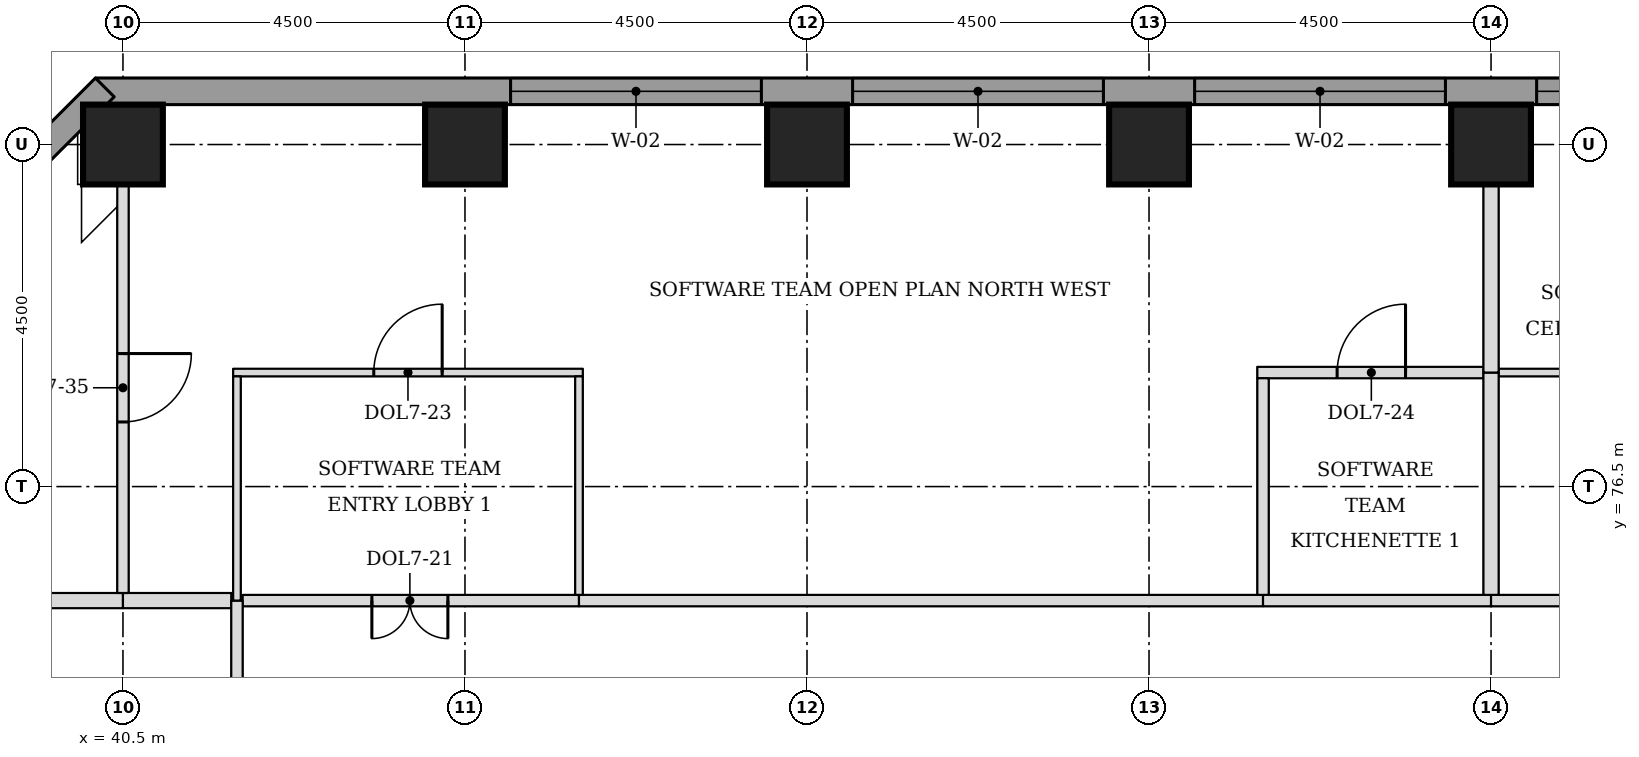
"""IFC4 building model, lengths in metres.
Left out: names, types, materials, properties, quantities, classifications, styles, units other than length and angle.
Written with IfcOpenShell. Run it as: python <this file> out.ifc"""

import sys

from ifc_helpers import new_model, si_unit, direction, frame, frame_2d, origin, origin_2d, place, context, subcontext, project, spatial, rectangle, extrude, element, fill, save


model = new_model("IFC4")
c1 = context("Model", 3, precision=1e-05, world=origin(), true_north=direction((0.0, 1.0)))
c2 = subcontext(c1, "Body", "Model", "MODEL_VIEW")
j1 = project(units=[si_unit("LENGTHUNIT", "METRE"), si_unit("PLANEANGLEUNIT", "RADIAN")], contexts=[c1])
p1 = place(None, origin())
s1 = spatial("IfcSite", under=j1, at=p1, CompositionType="ELEMENT")
p2 = place(p1, origin())
s2 = spatial("IfcBuilding", under=s1, at=p2, CompositionType="ELEMENT")
p3 = place(p2, frame((0.0, 0.0, 130.7)))
s3 = spatial("IfcBuildingStorey", under=s2, at=p3, CompositionType="ELEMENT", Elevation=130.7)
for number, where, z_axis, x_axis in (
    (1, (40.5, 81.0, 0.0), (0.0, 0.0, 1.0), (1.0, 0.0, 0.0)),
    (2, (45.0, 81.0, 0.0), (0.0, 0.0, 1.0), (1.0, 0.0, 0.0)),
    (3, (49.5, 81.0, 0.0), (0.0, 0.0, 1.0), (1.0, 0.0, 0.0)),
    (4, (54.0, 81.0, 0.0), (0.0, 0.0, 1.0), (1.0, 0.0, 0.0)),
    (5, (58.5, 81.0, 0.0), (0.0, 0.0, 1.0), (1.0, 0.0, 0.0)),
):
    element("IfcColumn", number, at=place(p3, frame(where, z_axis=z_axis, x_axis=x_axis)), inside=s3, PredefinedType="COLUMN", context=c2, shape_type="SweptSolid", body=[
        extrude(rectangle(XDim=1.05, YDim=1.05, at=origin_2d()), origin(), (0.0, 0.0, 1.0), 3.7),
    ])
p4 = place(p3, frame((72.362, 81.7, 0.0), z_axis=(0.0, 0.0, 1.0), x_axis=(-1.0, 0.0, 0.0)))
e6 = element("IfcWall", 6, at=p4, inside=s3, PredefinedType="STANDARD", context=c2, shape_type="SweptSolid", body=[
    extrude(rectangle(XDim=32.225, YDim=0.35, at=frame_2d((16.112, 0.0))), origin(), (0.0, 0.0, 1.0), 3.525),
])
p5 = place(p4, frame((5.462, 0.0, 0.9)))
e7 = element("IfcOpeningElement", 7, at=p5, cuts=e6, PredefinedType="OPENING", context=c2, shape_type="SweptSolid", body=[
    extrude(rectangle(XDim=3.3, YDim=1.9, at=frame_2d((1.65, 0.95))), frame((0.0, 0.185, 0.0), z_axis=(0.0, -1.0, 0.0), x_axis=(1.0, 0.0, 0.0)), (0.0, 0.0, 1.0), 0.37),
])
p6 = place(p4, frame((9.962, 0.0, 0.9)))
e8 = element("IfcOpeningElement", 8, at=p6, cuts=e6, PredefinedType="OPENING", context=c2, shape_type="SweptSolid", body=[
    extrude(rectangle(XDim=3.3, YDim=1.9, at=frame_2d((1.65, 0.95))), frame((0.0, 0.185, 0.0), z_axis=(0.0, -1.0, 0.0), x_axis=(1.0, 0.0, 0.0)), (0.0, 0.0, 1.0), 0.37),
])
p7 = place(p4, frame((14.462, 0.0, 0.9)))
e9 = element("IfcOpeningElement", 9, at=p7, cuts=e6, PredefinedType="OPENING", context=c2, shape_type="SweptSolid", body=[
    extrude(rectangle(XDim=3.3, YDim=1.9, at=frame_2d((1.65, 0.95))), frame((0.0, 0.185, 0.0), z_axis=(0.0, -1.0, 0.0), x_axis=(1.0, 0.0, 0.0)), (0.0, 0.0, 1.0), 0.37),
])
p8 = place(p4, frame((18.962, 0.0, 0.9)))
e10 = element("IfcOpeningElement", 10, at=p8, cuts=e6, PredefinedType="OPENING", context=c2, shape_type="SweptSolid", body=[
    extrude(rectangle(XDim=3.3, YDim=1.9, at=frame_2d((1.65, 0.95))), frame((0.0, 0.185, 0.0), z_axis=(0.0, -1.0, 0.0), x_axis=(1.0, 0.0, 0.0)), (0.0, 0.0, 1.0), 0.37),
])
p9 = place(p4, frame((23.462, 0.0, 0.9)))
e11 = element("IfcOpeningElement", 11, at=p9, cuts=e6, PredefinedType="OPENING", context=c2, shape_type="SweptSolid", body=[
    extrude(rectangle(XDim=3.3, YDim=1.9, at=frame_2d((1.65, 0.95))), frame((0.0, 0.185, 0.0), z_axis=(0.0, -1.0, 0.0), x_axis=(1.0, 0.0, 0.0)), (0.0, 0.0, 1.0), 0.37),
])
p10 = place(p3, frame((40.261, 81.751, 0.0), z_axis=(0.0, 0.0, 1.0), x_axis=(-0.707106781187, -0.707106781187, 0.0)))
e12 = element("IfcWall", 12, at=p10, inside=s3, PredefinedType="STANDARD", context=c2, shape_type="SweptSolid", body=[
    extrude(rectangle(XDim=7.089, YDim=0.35, at=frame_2d((3.544, 0.0))), origin(), (0.0, 0.0, 1.0), 3.525),
])
p11 = place(p10, frame((1.894, 0.0, 0.9)))
e13 = element("IfcOpeningElement", 13, at=p11, cuts=e12, PredefinedType="OPENING", context=c2, shape_type="SweptSolid", body=[
    extrude(rectangle(XDim=3.3, YDim=1.9, at=frame_2d((1.65, 0.95))), frame((0.0, 0.185, 0.0), z_axis=(0.0, -1.0, 0.0), x_axis=(1.0, 0.0, 0.0)), (0.0, 0.0, 1.0), 0.37),
])
p12 = place(p3, frame((35.475, 75.0, 0.0), z_axis=(0.0, 0.0, 1.0), x_axis=(1.0, 0.0, 0.0)))
e14 = element("IfcWall", 14, at=p12, inside=s3, PredefinedType="PARTITIONING", context=c2, shape_type="SweptSolid", body=[
    extrude(rectangle(XDim=5.025, YDim=0.2, at=frame_2d((2.512, 0.0))), origin(), (0.0, 0.0, 1.0), 3.55),
])
p13 = place(p3, frame((40.5, 75.0, 0.0), z_axis=(0.0, 0.0, 1.0), x_axis=(1.0, 0.0, 0.0)))
e15 = element("IfcWall", 15, at=p13, inside=s3, PredefinedType="PARTITIONING", context=c2, shape_type="SweptSolid", body=[
    extrude(rectangle(XDim=1.425, YDim=0.2, at=frame_2d((0.712, 0.0))), origin(), (0.0, 0.0, 1.0), 3.55),
])
p14 = place(p3, frame((42.075, 75.0, 0.0), z_axis=(0.0, 0.0, 1.0), x_axis=(1.0, 0.0, 0.0)))
e16 = element("IfcWall", 16, at=p14, inside=s3, PredefinedType="PARTITIONING", context=c2, shape_type="SweptSolid", body=[
    extrude(rectangle(XDim=4.425, YDim=0.15, at=frame_2d((2.212, 0.0))), origin(), (0.0, 0.0, 1.0), 3.55),
])
p15 = place(p14, frame((1.7, 0.0, 0.0)))
e17 = element("IfcOpeningElement", 17, at=p15, cuts=e16, PredefinedType="OPENING", context=c2, shape_type="SweptSolid", body=[
    extrude(rectangle(XDim=1.0, YDim=2.1, at=frame_2d((0.5, 1.05))), frame((0.0, 0.085, 0.0), z_axis=(0.0, -1.0, 0.0), x_axis=(1.0, 0.0, 0.0)), (0.0, 0.0, 1.0), 0.17),
])
p16 = place(p3, frame((46.5, 75.0, 0.0), z_axis=(0.0, 0.0, 1.0), x_axis=(1.0, 0.0, 0.0)))
e18 = element("IfcWall", 18, at=p16, inside=s3, PredefinedType="PARTITIONING", context=c2, shape_type="SweptSolid", body=[
    extrude(rectangle(XDim=9.0, YDim=0.15, at=frame_2d((4.5, 0.0))), origin(), (0.0, 0.0, 1.0), 3.55),
])
p17 = place(p3, frame((55.5, 75.0, 0.0), z_axis=(0.0, 0.0, 1.0), x_axis=(1.0, 0.0, 0.0)))
e19 = element("IfcWall", 19, at=p17, inside=s3, PredefinedType="PARTITIONING", context=c2, shape_type="SweptSolid", body=[
    extrude(rectangle(XDim=3.0, YDim=0.15, at=frame_2d((1.5, 0.0))), origin(), (0.0, 0.0, 1.0), 3.55),
])
p18 = place(p3, frame((58.5, 75.0, 0.0), z_axis=(0.0, 0.0, 1.0), x_axis=(1.0, 0.0, 0.0)))
e20 = element("IfcWall", 20, at=p18, inside=s3, PredefinedType="PARTITIONING", context=c2, shape_type="SweptSolid", body=[
    extrude(rectangle(XDim=12.0, YDim=0.15, at=frame_2d((6.0, 0.0))), origin(), (0.0, 0.0, 1.0), 3.55),
])
p19 = place(p18, frame((5.5, 0.0, 0.0)))
e21 = element("IfcOpeningElement", 21, at=p19, cuts=e20, PredefinedType="OPENING", context=c2, shape_type="SweptSolid", body=[
    extrude(rectangle(XDim=1.0, YDim=2.1, at=frame_2d((0.5, 1.05))), frame((0.0, 0.085, 0.0), z_axis=(0.0, -1.0, 0.0), x_axis=(1.0, 0.0, 0.0)), (0.0, 0.0, 1.0), 0.17),
])
p20 = place(p3, frame((41.95, 78.0, 0.0), z_axis=(0.0, 0.0, 1.0), x_axis=(1.0, 0.0, 0.0)))
e22 = element("IfcWall", 22, at=p20, inside=s3, PredefinedType="PARTITIONING", context=c2, shape_type="SweptSolid", body=[
    extrude(rectangle(XDim=4.6, YDim=0.1, at=frame_2d((2.3, 0.0))), origin(), (0.0, 0.0, 1.0), 3.55),
])
p21 = place(p20, frame((1.85, 0.0, 0.0)))
e23 = element("IfcOpeningElement", 23, at=p21, cuts=e22, PredefinedType="OPENING", context=c2, shape_type="SweptSolid", body=[
    extrude(rectangle(XDim=0.9, YDim=2.1, at=frame_2d((0.45, 1.05))), frame((0.0, 0.06, 0.0), z_axis=(0.0, -1.0, 0.0), x_axis=(1.0, 0.0, 0.0)), (0.0, 0.0, 1.0), 0.12),
])
p22 = place(p3, frame((55.425, 78.0, 0.0), z_axis=(0.0, 0.0, 1.0), x_axis=(1.0, 0.0, 0.0)))
e24 = element("IfcWall", 24, at=p22, inside=s3, PredefinedType="PARTITIONING", context=c2, shape_type="SweptSolid", body=[
    extrude(rectangle(XDim=2.975, YDim=0.15, at=frame_2d((1.487, 0.0))), origin(), (0.0, 0.0, 1.0), 3.55),
])
p23 = place(p22, frame((1.05, 0.0, 0.0)))
e25 = element("IfcOpeningElement", 25, at=p23, cuts=e24, PredefinedType="OPENING", context=c2, shape_type="SweptSolid", body=[
    extrude(rectangle(XDim=0.9, YDim=2.1, at=frame_2d((0.45, 1.05))), frame((0.0, 0.085, 0.0), z_axis=(0.0, -1.0, 0.0), x_axis=(1.0, 0.0, 0.0)), (0.0, 0.0, 1.0), 0.17),
])
p24 = place(p3, frame((58.6, 78.0, 0.0), z_axis=(0.0, 0.0, 1.0), x_axis=(1.0, 0.0, 0.0)))
e26 = element("IfcWall", 26, at=p24, inside=s3, PredefinedType="PARTITIONING", context=c2, shape_type="SweptSolid", body=[
    extrude(rectangle(XDim=4.45, YDim=0.1, at=frame_2d((2.225, 0.0))), origin(), (0.0, 0.0, 1.0), 3.55),
])
p25 = place(p3, frame((42.0, 57.075, 0.0), z_axis=(0.0, 0.0, 1.0), x_axis=(0.0, 1.0, 0.0)))
e27 = element("IfcWall", 27, at=p25, inside=s3, PredefinedType="PARTITIONING", context=c2, shape_type="SweptSolid", body=[
    extrude(rectangle(XDim=17.925, YDim=0.15, at=frame_2d((8.962, 0.0))), origin(), (0.0, 0.0, 1.0), 3.55),
])
p26 = place(p3, frame((42.0, 75.0, 0.0), z_axis=(0.0, 0.0, 1.0), x_axis=(0.0, 1.0, 0.0)))
e28 = element("IfcWall", 28, at=p26, inside=s3, PredefinedType="PARTITIONING", context=c2, shape_type="SweptSolid", body=[
    extrude(rectangle(XDim=2.95, YDim=0.1, at=frame_2d((1.475, 0.0))), origin(), (0.0, 0.0, 1.0), 3.55),
])
p27 = place(p3, frame((46.5, 75.075, 0.0), z_axis=(0.0, 0.0, 1.0), x_axis=(0.0, 1.0, 0.0)))
e29 = element("IfcWall", 29, at=p27, inside=s3, PredefinedType="PARTITIONING", context=c2, shape_type="SweptSolid", body=[
    extrude(rectangle(XDim=2.875, YDim=0.1, at=frame_2d((1.438, 0.0))), origin(), (0.0, 0.0, 1.0), 3.022),
])
p28 = place(p3, frame((55.5, 75.075, 0.0), z_axis=(0.0, 0.0, 1.0), x_axis=(0.0, 1.0, 0.0)))
e30 = element("IfcWall", 30, at=p28, inside=s3, PredefinedType="PARTITIONING", context=c2, shape_type="SweptSolid", body=[
    extrude(rectangle(XDim=2.85, YDim=0.15, at=frame_2d((1.425, 0.0))), origin(), (0.0, 0.0, 1.0), 3.55),
])
p29 = place(p3, frame((58.5, 75.075, 0.0), z_axis=(0.0, 0.0, 1.0), x_axis=(0.0, 1.0, 0.0)))
e31 = element("IfcWall", 31, at=p29, inside=s3, PredefinedType="PARTITIONING", context=c2, shape_type="SweptSolid", body=[
    extrude(rectangle(XDim=2.925, YDim=0.2, at=frame_2d((1.462, 0.0))), origin(), (0.0, 0.0, 1.0), 3.55),
])
p30 = place(p3, frame((40.5, 75.1, 0.0), z_axis=(0.0, 0.0, 1.0), x_axis=(0.0, 1.0, 0.0)))
e32 = element("IfcWall", 32, at=p30, inside=s3, PredefinedType="PARTITIONING", context=c2, shape_type="SweptSolid", body=[
    extrude(rectangle(XDim=5.375, YDim=0.15, at=frame_2d((2.688, 0.0))), origin(), (0.0, 0.0, 1.0), 3.55),
])
p31 = place(p30, frame((2.25, 0.0, 0.0)))
e33 = element("IfcOpeningElement", 33, at=p31, cuts=e32, PredefinedType="OPENING", context=c2, shape_type="SweptSolid", body=[
    extrude(rectangle(XDim=0.9, YDim=2.1, at=frame_2d((0.45, 1.05))), frame((0.0, 0.085, 0.0), z_axis=(0.0, -1.0, 0.0), x_axis=(1.0, 0.0, 0.0)), (0.0, 0.0, 1.0), 0.17),
])
p32 = place(p3, frame((58.5, 78.0, 0.0), z_axis=(0.0, 0.0, 1.0), x_axis=(0.0, 1.0, 0.0)))
e34 = element("IfcWall", 34, at=p32, inside=s3, PredefinedType="PARTITIONING", context=c2, shape_type="SweptSolid", body=[
    extrude(rectangle(XDim=3.525, YDim=0.2, at=frame_2d((1.762, 0.0))), origin(), (0.0, 0.0, 1.0), 3.55),
])
p33 = place(p6, origin())
e35 = element("IfcWindow", 35, at=p33, inside=s3, PartitioningType="SINGLE_PANEL", PredefinedType="WINDOW", context=c2, shape_type="SweptSolid", body=[
    extrude(rectangle(XDim=3.3, YDim=1.9, at=frame_2d((1.65, 0.95))), frame((0.0, 0.085, 0.0), z_axis=(0.0, -1.0, 0.0), x_axis=(1.0, 0.0, 0.0)), (0.0, 0.0, 1.0), 0.06),
])
fill(e8, e35)
p34 = place(p7, origin())
e36 = element("IfcWindow", 36, at=p34, inside=s3, PartitioningType="SINGLE_PANEL", PredefinedType="WINDOW", context=c2, shape_type="SweptSolid", body=[
    extrude(rectangle(XDim=3.3, YDim=1.9, at=frame_2d((1.65, 0.95))), frame((0.0, 0.085, 0.0), z_axis=(0.0, -1.0, 0.0), x_axis=(1.0, 0.0, 0.0)), (0.0, 0.0, 1.0), 0.06),
])
fill(e9, e36)
p35 = place(p8, origin())
e37 = element("IfcWindow", 37, at=p35, inside=s3, PartitioningType="SINGLE_PANEL", PredefinedType="WINDOW", context=c2, shape_type="SweptSolid", body=[
    extrude(rectangle(XDim=3.3, YDim=1.9, at=frame_2d((1.65, 0.95))), frame((0.0, 0.085, 0.0), z_axis=(0.0, -1.0, 0.0), x_axis=(1.0, 0.0, 0.0)), (0.0, 0.0, 1.0), 0.06),
])
fill(e10, e37)
p36 = place(p9, origin())
e38 = element("IfcWindow", 38, at=p36, inside=s3, PartitioningType="SINGLE_PANEL", PredefinedType="WINDOW", context=c2, shape_type="SweptSolid", body=[
    extrude(rectangle(XDim=3.3, YDim=1.9, at=frame_2d((1.65, 0.95))), frame((0.0, 0.085, 0.0), z_axis=(0.0, -1.0, 0.0), x_axis=(1.0, 0.0, 0.0)), (0.0, 0.0, 1.0), 0.06),
])
fill(e11, e38)
p37 = place(p15, frame((1.0, 0.0, 0.0), z_axis=(0.0, 0.0, 1.0), x_axis=(-1.0, 0.0, 0.0)))
e39 = element("IfcDoor", 39, at=p37, inside=s3, OperationType="DOUBLE_DOOR_SINGLE_SWING", PredefinedType="DOOR", context=c2, shape_type="SweptSolid", body=[
    extrude(rectangle(XDim=1.0, YDim=2.1, at=frame_2d((0.5, 1.05))), frame((0.0, 0.025, 0.0), z_axis=(0.0, -1.0, 0.0), x_axis=(1.0, 0.0, 0.0)), (0.0, 0.0, 1.0), 0.05),
])
fill(e17, e39)
p38 = place(p21, origin())
e40 = element("IfcDoor", 40, at=p38, inside=s3, OperationType="SINGLE_SWING_RIGHT", PredefinedType="DOOR", context=c2, shape_type="SweptSolid", body=[
    extrude(rectangle(XDim=0.9, YDim=2.1, at=frame_2d((0.45, 1.05))), frame((0.0, 0.025, 0.0), z_axis=(0.0, -1.0, 0.0), x_axis=(1.0, 0.0, 0.0)), (0.0, 0.0, 1.0), 0.05),
])
fill(e23, e40)
p39 = place(p23, origin())
e41 = element("IfcDoor", 41, at=p39, inside=s3, OperationType="SINGLE_SWING_RIGHT", PredefinedType="DOOR", context=c2, shape_type="SweptSolid", body=[
    extrude(rectangle(XDim=0.9, YDim=2.1, at=frame_2d((0.45, 1.05))), frame((0.0, 0.025, 0.0), z_axis=(0.0, -1.0, 0.0), x_axis=(1.0, 0.0, 0.0)), (0.0, 0.0, 1.0), 0.05),
])
fill(e25, e41)
p40 = place(p31, frame((0.9, 0.0, 0.0), z_axis=(0.0, 0.0, 1.0), x_axis=(-1.0, 0.0, 0.0)))
e42 = element("IfcDoor", 42, at=p40, inside=s3, OperationType="SINGLE_SWING_LEFT", PredefinedType="DOOR", context=c2, shape_type="SweptSolid", body=[
    extrude(rectangle(XDim=0.9, YDim=2.1, at=frame_2d((0.45, 1.05))), frame((0.0, 0.025, 0.0), z_axis=(0.0, -1.0, 0.0), x_axis=(1.0, 0.0, 0.0)), (0.0, 0.0, 1.0), 0.05),
])
fill(e33, e42)
save(model, sys.argv[1])
